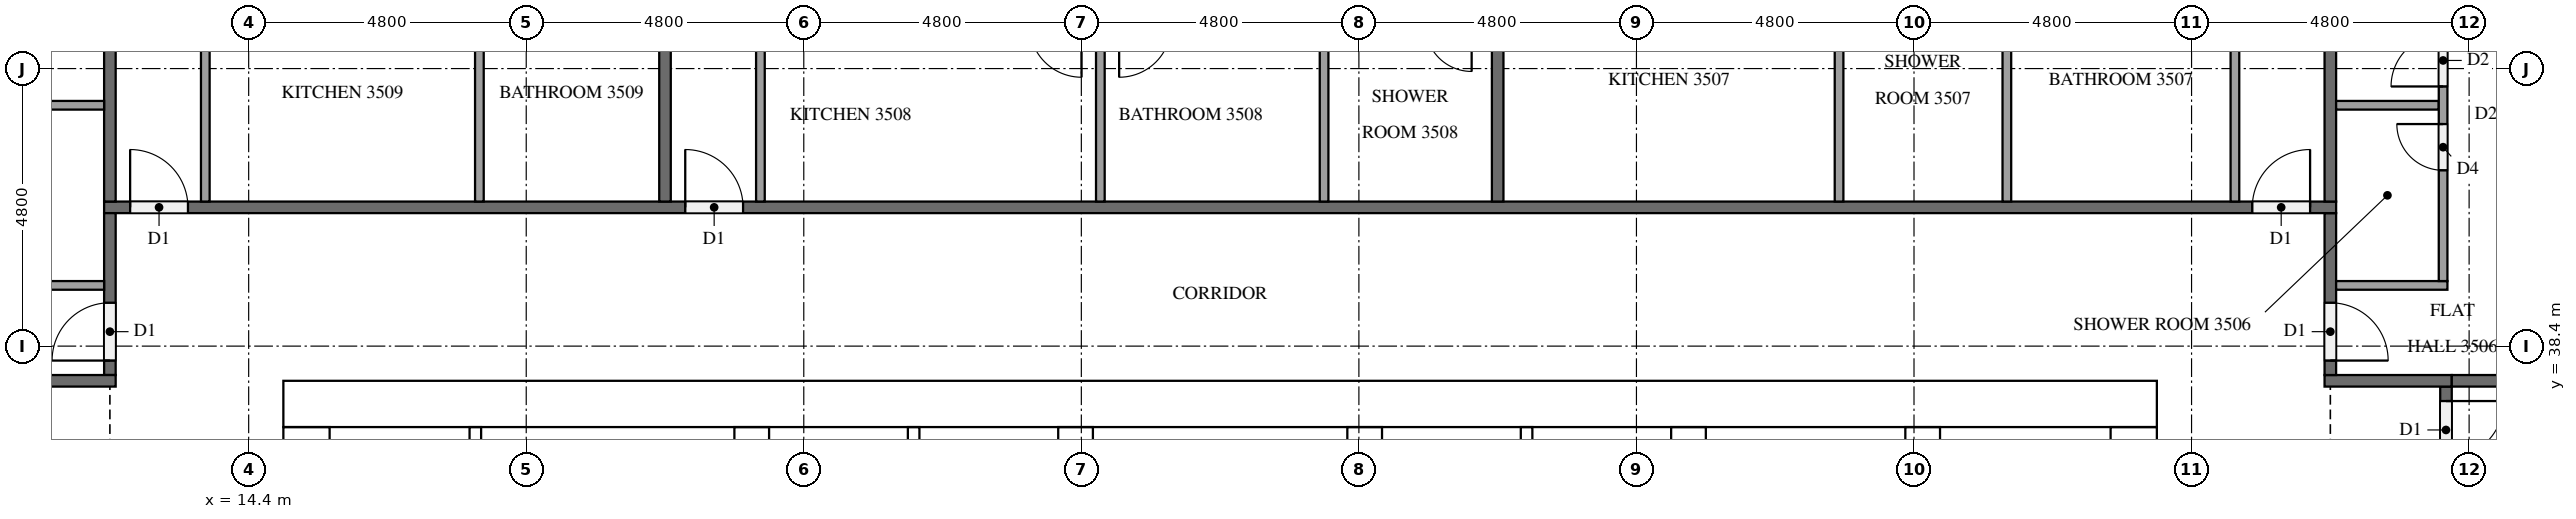
"""IFC4 building model, lengths in metres.
Left out: names, types, materials, properties, quantities, classifications, styles, units other than length and angle.
Written with IfcOpenShell. Run it as: python <this file> out.ifc"""

import sys

from ifc_helpers import new_model, si_unit, direction, frame, frame_2d, origin, place, context, subcontext, project, spatial, rectangle, extrude, element, fill, save


model = new_model("IFC4")
c1 = context("Model", 3, precision=1e-05, world=origin(), true_north=direction((0.0, 1.0)))
c2 = subcontext(c1, "Body", "Model", "MODEL_VIEW")
j1 = project(units=[si_unit("LENGTHUNIT", "METRE"), si_unit("PLANEANGLEUNIT", "RADIAN")], contexts=[c1])
p1 = place(None, origin())
s1 = spatial("IfcSite", under=j1, at=p1, CompositionType="ELEMENT")
p2 = place(p1, origin())
s2 = spatial("IfcBuilding", under=s1, at=p2, CompositionType="ELEMENT")
p3 = place(p2, frame((0.0, 0.0, 136.6)))
s3 = spatial("IfcBuildingStorey", under=s2, at=p3, CompositionType="ELEMENT", Elevation=136.6)
p4 = place(p3, frame((15.0, 37.4, 0.0), z_axis=(0.0, 0.0, 1.0), x_axis=(1.0, 0.0, 0.0)))
e1 = element("IfcWall", 1, at=p4, inside=s3, PredefinedType="SHEAR", context=c2, shape_type="SweptSolid", body=[
    extrude(rectangle(XDim=32.4, YDim=0.8, at=frame_2d((16.2, 0.0))), origin(), (0.0, 0.0, 1.0), 3.2),
])
p5 = place(p4, frame((15.3, 0.0, 0.0)))
e2 = element("IfcOpeningElement", 2, at=p5, cuts=e1, PredefinedType="OPENING", context=c2, shape_type="SweptSolid", body=[
    extrude(rectangle(XDim=1.8, YDim=2.1, at=frame_2d((0.9, 1.05))), frame((0.0, 0.41, 0.0), z_axis=(0.0, -1.0, 0.0), x_axis=(1.0, 0.0, 0.0)), (0.0, 0.0, 1.0), 0.82),
])
p6 = place(p4, frame((1.51, 0.0, 0.0)))
e3 = element("IfcOpeningElement", 3, at=p6, cuts=e1, PredefinedType="OPENING", context=c2, shape_type="SweptSolid", body=[
    extrude(rectangle(XDim=1.0, YDim=2.1, at=frame_2d((0.5, 1.05))), frame((0.0, 0.41, 0.0), z_axis=(0.0, -1.0, 0.0), x_axis=(1.0, 0.0, 0.0)), (0.0, 0.0, 1.0), 0.82),
])
p7 = place(p4, frame((5.11, 0.0, 0.0)))
e4 = element("IfcOpeningElement", 4, at=p7, cuts=e1, PredefinedType="OPENING", context=c2, shape_type="SweptSolid", body=[
    extrude(rectangle(XDim=1.0, YDim=2.1, at=frame_2d((0.5, 1.05))), frame((0.0, 0.41, 0.0), z_axis=(0.0, -1.0, 0.0), x_axis=(1.0, 0.0, 0.0)), (0.0, 0.0, 1.0), 0.82),
])
p8 = place(p3, frame((15.4, 15.8, 0.0), z_axis=(0.0, 0.0, 1.0), x_axis=(0.0, 1.0, 0.0)))
e5 = element("IfcWall", 5, at=p8, inside=s3, PredefinedType="SHEAR", context=c2, shape_type="SweptSolid", body=[
    extrude(rectangle(XDim=21.2, YDim=0.8, at=frame_2d((10.6, 0.0))), origin(), (0.0, 0.0, 1.0), 3.2),
])
p9 = place(p8, frame((4.96, 0.0, 0.0)))
e6 = element("IfcOpeningElement", 6, at=p9, cuts=e5, PredefinedType="OPENING", context=c2, shape_type="SweptSolid", body=[
    extrude(rectangle(XDim=1.2, YDim=2.1, at=frame_2d((0.6, 1.05))), frame((0.0, 0.41, 0.0), z_axis=(0.0, -1.0, 0.0), x_axis=(1.0, 0.0, 0.0)), (0.0, 0.0, 1.0), 0.82),
])
p10 = place(p3, frame((47.0, 15.8, 0.0), z_axis=(0.0, 0.0, 1.0), x_axis=(0.0, 1.0, 0.0)))
e7 = element("IfcWall", 7, at=p10, inside=s3, PredefinedType="SHEAR", context=c2, shape_type="SweptSolid", body=[
    extrude(rectangle(XDim=21.2, YDim=0.8, at=frame_2d((10.6, 0.0))), origin(), (0.0, 0.0, 1.0), 3.2),
])
p11 = place(p10, frame((10.3, 0.0, 0.0)))
e8 = element("IfcOpeningElement", 8, at=p11, cuts=e7, PredefinedType="OPENING", context=c2, shape_type="SweptSolid", body=[
    extrude(rectangle(XDim=1.2, YDim=2.1, at=frame_2d((0.6, 1.05))), frame((0.0, 0.41, 0.0), z_axis=(0.0, -1.0, 0.0), x_axis=(1.0, 0.0, 0.0)), (0.0, 0.0, 1.0), 0.82),
])
p12 = place(p3, frame((23.1, 15.8, 0.0), z_axis=(0.0, 0.0, 1.0), x_axis=(0.0, 1.0, 0.0)))
e9 = element("IfcWall", 9, at=p12, inside=s3, PredefinedType="SHEAR", context=c2, shape_type="SweptSolid", body=[
    extrude(rectangle(XDim=21.2, YDim=0.6, at=frame_2d((10.6, 0.0))), origin(), (0.0, 0.0, 1.0), 3.2),
])
p13 = place(p3, frame((39.3, 27.75, 0.0), z_axis=(0.0, 0.0, 1.0), x_axis=(0.0, 1.0, 0.0)))
e10 = element("IfcWall", 10, at=p13, inside=s3, PredefinedType="SHEAR", context=c2, shape_type="SweptSolid", body=[
    extrude(rectangle(XDim=9.25, YDim=0.6, at=frame_2d((4.625, 0.0))), origin(), (0.0, 0.0, 1.0), 3.2),
])
p14 = place(p3, frame((43.35, 27.75, 0.0), z_axis=(0.0, 0.0, 1.0), x_axis=(0.0, 1.0, 0.0)))
e11 = element("IfcWall", 11, at=p14, inside=s3, PredefinedType="SHEAR", context=c2, shape_type="SweptSolid", body=[
    extrude(rectangle(XDim=9.25, YDim=0.6, at=frame_2d((4.625, 0.0))), origin(), (0.0, 0.0, 1.0), 3.2),
])
p15 = place(p14, frame((7.65, 0.0, 0.0)))
e12 = element("IfcOpeningElement", 12, at=p15, cuts=e11, PredefinedType="OPENING", context=c2, shape_type="SweptSolid", body=[
    extrude(rectangle(XDim=1.2, YDim=2.1, at=frame_2d((0.6, 1.05))), frame((0.0, 0.31, 0.0), z_axis=(0.0, -1.0, 0.0), x_axis=(1.0, 0.0, 0.0)), (0.0, 0.0, 1.0), 0.62),
])
for number, where, z_axis, x_axis in (
    (13, (28.7, 33.85, 0.0), (0.0, 0.0, 1.0), (0.0, 1.0, 0.0)),
    (14, (33.7, 33.85, 0.0), (0.0, 0.0, 1.0), (0.0, 1.0, 0.0)),
):
    element("IfcWall", number, at=place(p3, frame(where, z_axis=z_axis, x_axis=x_axis)), inside=s3, PredefinedType="SHEAR", context=c2, shape_type="SweptSolid", body=[
        extrude(rectangle(XDim=3.15, YDim=0.6, at=frame_2d((1.575, 0.0))), origin(), (0.0, 0.0, 1.0), 3.2),
    ])
for number, where, z_axis, x_axis in (
    (15, (25.9, 33.85, 0.0), (0.0, 0.0, 1.0), (0.0, 1.0, 0.0)),
    (16, (36.5, 33.85, 0.0), (0.0, 0.0, 1.0), (0.0, 1.0, 0.0)),
):
    element("IfcWall", number, at=place(p3, frame(where, z_axis=z_axis, x_axis=x_axis)), inside=s3, PredefinedType="SOLIDWALL", context=c2, shape_type="SweptSolid", body=[
        extrude(rectangle(XDim=3.15, YDim=0.2, at=frame_2d((1.575, 0.0))), origin(), (0.0, 0.0, 1.0), 3.2),
    ])
p16 = place(p3, frame((18.32, 31.55, 0.0), z_axis=(0.0, 0.0, 1.0), x_axis=(0.0, 1.0, 0.0)))
e17 = element("IfcWall", 17, at=p16, inside=s3, PredefinedType="PARTITIONING", context=c2, shape_type="SweptSolid", body=[
    extrude(rectangle(XDim=5.45, YDim=0.2, at=frame_2d((2.725, 0.0))), origin(), (0.0, 0.0, 1.0), 3.2),
])
p17 = place(p3, frame((52.4, 37.7, 0.0), z_axis=(0.0, 0.0, 1.0), x_axis=(0.0, -1.0, 0.0)))
e18 = element("IfcWall", 18, at=p17, inside=s3, PredefinedType="PARTITIONING", context=c2, shape_type="SweptSolid", body=[
    extrude(rectangle(XDim=22.6, YDim=0.2, at=frame_2d((11.3, 0.0))), origin(), (0.0, 0.0, 1.0), 3.2),
])
p18 = place(p17, frame((0.25, 0.0, 0.0)))
e19 = element("IfcOpeningElement", 19, at=p18, cuts=e18, PredefinedType="OPENING", context=c2, shape_type="SweptSolid", body=[
    extrude(rectangle(XDim=1.0, YDim=2.1, at=frame_2d((0.5, 1.05))), frame((0.0, 0.11, 0.0), z_axis=(0.0, -1.0, 0.0), x_axis=(1.0, 0.0, 0.0)), (0.0, 0.0, 1.0), 0.22),
])
p19 = place(p3, frame((52.5, 37.8, 0.0), z_axis=(0.0, 0.0, 1.0), x_axis=(-1.0, 0.0, 0.0)))
e20 = element("IfcWall", 20, at=p19, inside=s3, PredefinedType="PARTITIONING", context=c2, shape_type="SweptSolid", body=[
    extrude(rectangle(XDim=2.2, YDim=0.2, at=frame_2d((1.1, 0.0))), origin(), (0.0, 0.0, 1.0), 3.2),
])
p20 = place(p3, frame((50.4, 40.7, 0.0), z_axis=(0.0, 0.0, 1.0), x_axis=(0.0, -1.0, 0.0)))
e21 = element("IfcWall", 21, at=p20, inside=s3, PredefinedType="PARTITIONING", context=c2, shape_type="SweptSolid", body=[
    extrude(rectangle(XDim=2.8, YDim=0.2, at=frame_2d((1.4, 0.0))), origin(), (0.0, 0.0, 1.0), 3.2),
])
p21 = place(p20, frame((1.55, 0.0, 0.0)))
e22 = element("IfcOpeningElement", 22, at=p21, cuts=e21, PredefinedType="OPENING", context=c2, shape_type="SweptSolid", body=[
    extrude(rectangle(XDim=1.0, YDim=2.1, at=frame_2d((0.5, 1.05))), frame((0.0, 0.11, 0.0), z_axis=(0.0, -1.0, 0.0), x_axis=(1.0, 0.0, 0.0)), (0.0, 0.0, 1.0), 0.22),
])
p22 = place(p3, frame((11.9, 40.8, 0.0), z_axis=(0.0, 0.0, 1.0), x_axis=(1.0, 0.0, 0.0)))
e23 = element("IfcWall", 23, at=p22, inside=s3, PredefinedType="PARTITIONING", context=c2, shape_type="SweptSolid", body=[
    extrude(rectangle(XDim=38.6, YDim=0.2, at=frame_2d((19.3, 0.0))), origin(), (0.0, 0.0, 1.0), 3.2),
])
p23 = place(p22, frame((37.15, 0.0, 0.0)))
e24 = element("IfcOpeningElement", 24, at=p23, cuts=e23, PredefinedType="OPENING", context=c2, shape_type="SweptSolid", body=[
    extrude(rectangle(XDim=1.0, YDim=2.1, at=frame_2d((0.5, 1.05))), frame((0.0, 0.11, 0.0), z_axis=(0.0, -1.0, 0.0), x_axis=(1.0, 0.0, 0.0)), (0.0, 0.0, 1.0), 0.22),
])
p24 = place(p22, frame((10.05, 0.0, 0.0)))
e25 = element("IfcOpeningElement", 25, at=p24, cuts=e23, PredefinedType="OPENING", context=c2, shape_type="SweptSolid", body=[
    extrude(rectangle(XDim=1.0, YDim=2.1, at=frame_2d((0.5, 1.05))), frame((0.0, 0.11, 0.0), z_axis=(0.0, -1.0, 0.0), x_axis=(1.0, 0.0, 0.0)), (0.0, 0.0, 1.0), 0.22),
])
p25 = place(p22, frame((0.45, 0.0, 0.0)))
e26 = element("IfcOpeningElement", 26, at=p25, cuts=e23, PredefinedType="OPENING", context=c2, shape_type="SweptSolid", body=[
    extrude(rectangle(XDim=1.0, YDim=2.1, at=frame_2d((0.5, 1.05))), frame((0.0, 0.11, 0.0), z_axis=(0.0, -1.0, 0.0), x_axis=(1.0, 0.0, 0.0)), (0.0, 0.0, 1.0), 0.22),
])
p26 = place(p3, frame((12.0, 37.9, 0.0), z_axis=(0.0, 0.0, 1.0), x_axis=(0.0, 1.0, 0.0)))
e27 = element("IfcWall", 27, at=p26, inside=s3, PredefinedType="PARTITIONING", context=c2, shape_type="SweptSolid", body=[
    extrude(rectangle(XDim=2.8, YDim=0.2, at=frame_2d((1.4, 0.0))), origin(), (0.0, 0.0, 1.0), 3.2),
])
p27 = place(p26, frame((0.25, 0.0, 0.0)))
e28 = element("IfcOpeningElement", 28, at=p27, cuts=e27, PredefinedType="OPENING", context=c2, shape_type="SweptSolid", body=[
    extrude(rectangle(XDim=1.0, YDim=2.1, at=frame_2d((0.5, 1.05))), frame((0.0, 0.11, 0.0), z_axis=(0.0, -1.0, 0.0), x_axis=(1.0, 0.0, 0.0)), (0.0, 0.0, 1.0), 0.22),
])
p28 = place(p3, frame((12.1, 37.8, 0.0), z_axis=(0.0, 0.0, 1.0), x_axis=(-1.0, 0.0, 0.0)))
e29 = element("IfcWall", 29, at=p28, inside=s3, PredefinedType="PARTITIONING", context=c2, shape_type="SweptSolid", body=[
    extrude(rectangle(XDim=2.2, YDim=0.2, at=frame_2d((1.1, 0.0))), origin(), (0.0, 0.0, 1.0), 3.2),
])
p29 = place(p3, frame((52.5, 37.8, 0.0), z_axis=(0.0, 0.0, 1.0), x_axis=(1.0, 0.0, 0.0)))
e30 = element("IfcWall", 30, at=p29, inside=s3, PredefinedType="PARTITIONING", context=c2, shape_type="SweptSolid", body=[
    extrude(rectangle(XDim=4.725, YDim=0.2, at=frame_2d((2.363, 0.0))), origin(), (0.0, 0.0, 1.0), 3.2),
])
for number, where, z_axis, x_axis in (
    (31, (50.4, 40.9, 0.0), (0.0, 0.0, 1.0), (0.0, 1.0, 0.0)),
    (32, (36.0, 52.7, 0.0), (0.0, 0.0, 1.0), (0.0, -1.0, 0.0)),
    (33, (21.6, 52.7, 0.0), (0.0, 0.0, 1.0), (0.0, -1.0, 0.0)),
    (34, (12.0, 52.7, 0.0), (0.0, 0.0, 1.0), (0.0, -1.0, 0.0)),
):
    element("IfcWall", number, at=place(p3, frame(where, z_axis=z_axis, x_axis=x_axis)), inside=s3, PredefinedType="PARTITIONING", context=c2, shape_type="SweptSolid", body=[
        extrude(rectangle(XDim=11.8, YDim=0.2, at=frame_2d((5.9, 0.0))), origin(), (0.0, 0.0, 1.0), 3.2),
    ])
p30 = place(p3, frame((50.5, 42.565, 0.0), z_axis=(0.0, 0.0, 1.0), x_axis=(1.0, 0.0, 0.0)))
e35 = element("IfcWall", 35, at=p30, inside=s3, PredefinedType="PARTITIONING", context=c2, shape_type="SweptSolid", body=[
    extrude(rectangle(XDim=1.775, YDim=0.15, at=frame_2d((0.887, 0.0))), origin(), (0.0, 0.0, 1.0), 3.2),
])
p31 = place(p3, frame((50.5, 39.45, 0.0), z_axis=(0.0, 0.0, 1.0), x_axis=(1.0, 0.0, 0.0)))
e36 = element("IfcWall", 36, at=p31, inside=s3, PredefinedType="PARTITIONING", context=c2, shape_type="SweptSolid", body=[
    extrude(rectangle(XDim=1.925, YDim=0.15, at=frame_2d((0.962, 0.0))), origin(), (0.0, 0.0, 1.0), 3.2),
])
p32 = place(p3, frame((52.35, 39.525, 0.0), z_axis=(0.0, 0.0, 1.0), x_axis=(0.0, 1.0, 0.0)))
e37 = element("IfcWall", 37, at=p32, inside=s3, PredefinedType="PARTITIONING", context=c2, shape_type="SweptSolid", body=[
    extrude(rectangle(XDim=12.75, YDim=0.15, at=frame_2d((6.375, 0.0))), origin(), (0.0, 0.0, 1.0), 3.2),
])
p33 = place(p32, frame((1.915, 0.0, 0.0)))
e38 = element("IfcOpeningElement", 38, at=p33, cuts=e37, PredefinedType="OPENING", context=c2, shape_type="SweptSolid", body=[
    extrude(rectangle(XDim=0.8, YDim=2.1, at=frame_2d((0.4, 1.05))), frame((0.0, 0.085, 0.0), z_axis=(0.0, -1.0, 0.0), x_axis=(1.0, 0.0, 0.0)), (0.0, 0.0, 1.0), 0.17),
])
p34 = place(p32, frame((3.365, 0.0, 0.0)))
e39 = element("IfcOpeningElement", 39, at=p34, cuts=e37, PredefinedType="OPENING", context=c2, shape_type="SweptSolid", body=[
    extrude(rectangle(XDim=0.9, YDim=2.1, at=frame_2d((0.45, 1.05))), frame((0.0, 0.085, 0.0), z_axis=(0.0, -1.0, 0.0), x_axis=(1.0, 0.0, 0.0)), (0.0, 0.0, 1.0), 0.17),
])
p35 = place(p32, frame((11.55, 0.0, 0.0)))
e40 = element("IfcOpeningElement", 40, at=p35, cuts=e37, PredefinedType="OPENING", context=c2, shape_type="SweptSolid", body=[
    extrude(rectangle(XDim=0.9, YDim=2.1, at=frame_2d((0.45, 1.05))), frame((0.0, 0.085, 0.0), z_axis=(0.0, -1.0, 0.0), x_axis=(1.0, 0.0, 0.0)), (0.0, 0.0, 1.0), 0.17),
])
for number, where, z_axis, x_axis in (
    (41, (44.806, 40.9, 0.0), (0.0, 0.0, 1.0), (0.0, 1.0, 0.0)),
    (42, (41.904, 40.9, 0.0), (0.0, 0.0, 1.0), (0.0, 1.0, 0.0)),
):
    element("IfcWall", number, at=place(p3, frame(where, z_axis=z_axis, x_axis=x_axis)), inside=s3, PredefinedType="PARTITIONING", context=c2, shape_type="SweptSolid", body=[
        extrude(rectangle(XDim=4.175, YDim=0.15, at=frame_2d((2.087, 0.0))), origin(), (0.0, 0.0, 1.0), 3.2),
    ])
p36 = place(p3, frame((48.75, 40.9, 0.0), z_axis=(0.0, 0.0, 1.0), x_axis=(0.0, 1.0, 0.0)))
e43 = element("IfcWall", 43, at=p36, inside=s3, PredefinedType="PARTITIONING", context=c2, shape_type="SweptSolid", body=[
    extrude(rectangle(XDim=4.325, YDim=0.15, at=frame_2d((2.163, 0.0))), origin(), (0.0, 0.0, 1.0), 3.2),
])
for number, where, z_axis, x_axis in (
    (44, (29.129, 40.9, 0.0), (0.0, 0.0, 1.0), (0.0, 1.0, 0.0)),
    (45, (32.998, 40.9, 0.0), (0.0, 0.0, 1.0), (0.0, 1.0, 0.0)),
):
    element("IfcWall", number, at=place(p3, frame(where, z_axis=z_axis, x_axis=x_axis)), inside=s3, PredefinedType="PARTITIONING", context=c2, shape_type="SweptSolid", body=[
        extrude(rectangle(XDim=2.975, YDim=0.15, at=frame_2d((1.488, 0.0))), origin(), (0.0, 0.0, 1.0), 3.2),
    ])
p37 = place(p3, frame((23.25, 40.9, 0.0), z_axis=(0.0, 0.0, 1.0), x_axis=(0.0, 1.0, 0.0)))
e46 = element("IfcWall", 46, at=p37, inside=s3, PredefinedType="PARTITIONING", context=c2, shape_type="SweptSolid", body=[
    extrude(rectangle(XDim=3.125, YDim=0.15, at=frame_2d((1.562, 0.0))), origin(), (0.0, 0.0, 1.0), 3.2),
])
p38 = place(p3, frame((18.39, 40.9, 0.0), z_axis=(0.0, 0.0, 1.0), x_axis=(0.0, 1.0, 0.0)))
e47 = element("IfcWall", 47, at=p38, inside=s3, PredefinedType="PARTITIONING", context=c2, shape_type="SweptSolid", body=[
    extrude(rectangle(XDim=3.725, YDim=0.15, at=frame_2d((1.863, 0.0))), origin(), (0.0, 0.0, 1.0), 3.2),
])
p39 = place(p3, frame((13.65, 40.9, 0.0), z_axis=(0.0, 0.0, 1.0), x_axis=(0.0, 1.0, 0.0)))
e48 = element("IfcWall", 48, at=p39, inside=s3, PredefinedType="PARTITIONING", context=c2, shape_type="SweptSolid", body=[
    extrude(rectangle(XDim=3.875, YDim=0.15, at=frame_2d((1.938, 0.0))), origin(), (0.0, 0.0, 1.0), 3.2),
])
p40 = place(p3, frame((11.9, 42.565, 0.0), z_axis=(0.0, 0.0, 1.0), x_axis=(-1.0, 0.0, 0.0)))
e49 = element("IfcWall", 49, at=p40, inside=s3, PredefinedType="PARTITIONING", context=c2, shape_type="SweptSolid", body=[
    extrude(rectangle(XDim=3.275, YDim=0.15, at=frame_2d((1.637, 0.0))), origin(), (0.0, 0.0, 1.0), 3.2),
])
p41 = place(p3, frame((11.9, 39.45, 0.0), z_axis=(0.0, 0.0, 1.0), x_axis=(-1.0, 0.0, 0.0)))
e50 = element("IfcWall", 50, at=p41, inside=s3, PredefinedType="PARTITIONING", context=c2, shape_type="SweptSolid", body=[
    extrude(rectangle(XDim=3.425, YDim=0.15, at=frame_2d((1.712, 0.0))), origin(), (0.0, 0.0, 1.0), 3.2),
])
p42 = place(p5, origin())
e51 = element("IfcDoor", 51, at=p42, inside=s3, OperationType="DOUBLE_DOOR_SINGLE_SWING", PredefinedType="DOOR", context=c2, shape_type="SweptSolid", body=[
    extrude(rectangle(XDim=1.8, YDim=2.1, at=frame_2d((0.9, 1.05))), frame((0.0, 0.025, 0.0), z_axis=(0.0, -1.0, 0.0), x_axis=(1.0, 0.0, 0.0)), (0.0, 0.0, 1.0), 0.05),
])
fill(e2, e51)
p43 = place(p6, origin())
e52 = element("IfcDoor", 52, at=p43, inside=s3, OperationType="SINGLE_SWING_RIGHT", PredefinedType="DOOR", context=c2, shape_type="SweptSolid", body=[
    extrude(rectangle(XDim=1.0, YDim=2.1, at=frame_2d((0.5, 1.05))), frame((0.0, 0.025, 0.0), z_axis=(0.0, -1.0, 0.0), x_axis=(1.0, 0.0, 0.0)), (0.0, 0.0, 1.0), 0.05),
])
fill(e3, e52)
p44 = place(p7, origin())
e53 = element("IfcDoor", 53, at=p44, inside=s3, OperationType="SINGLE_SWING_LEFT", PredefinedType="DOOR", context=c2, shape_type="SweptSolid", body=[
    extrude(rectangle(XDim=1.0, YDim=2.1, at=frame_2d((0.5, 1.05))), frame((0.0, 0.025, 0.0), z_axis=(0.0, -1.0, 0.0), x_axis=(1.0, 0.0, 0.0)), (0.0, 0.0, 1.0), 0.05),
])
fill(e4, e53)
p45 = place(p18, origin())
e54 = element("IfcDoor", 54, at=p45, inside=s3, OperationType="SINGLE_SWING_LEFT", PredefinedType="DOOR", context=c2, shape_type="SweptSolid", body=[
    extrude(rectangle(XDim=1.0, YDim=2.1, at=frame_2d((0.5, 1.05))), frame((0.0, 0.025, 0.0), z_axis=(0.0, -1.0, 0.0), x_axis=(1.0, 0.0, 0.0)), (0.0, 0.0, 1.0), 0.05),
])
fill(e19, e54)
p46 = place(p21, origin())
e55 = element("IfcDoor", 55, at=p46, inside=s3, OperationType="SINGLE_SWING_RIGHT", PredefinedType="DOOR", context=c2, shape_type="SweptSolid", body=[
    extrude(rectangle(XDim=1.0, YDim=2.1, at=frame_2d((0.5, 1.05))), frame((0.0, 0.025, 0.0), z_axis=(0.0, -1.0, 0.0), x_axis=(1.0, 0.0, 0.0)), (0.0, 0.0, 1.0), 0.05),
])
fill(e22, e55)
p47 = place(p23, origin())
e56 = element("IfcDoor", 56, at=p47, inside=s3, OperationType="SINGLE_SWING_RIGHT", PredefinedType="DOOR", context=c2, shape_type="SweptSolid", body=[
    extrude(rectangle(XDim=1.0, YDim=2.1, at=frame_2d((0.5, 1.05))), frame((0.0, 0.025, 0.0), z_axis=(0.0, -1.0, 0.0), x_axis=(1.0, 0.0, 0.0)), (0.0, 0.0, 1.0), 0.05),
])
fill(e24, e56)
p48 = place(p24, origin())
e57 = element("IfcDoor", 57, at=p48, inside=s3, OperationType="SINGLE_SWING_LEFT", PredefinedType="DOOR", context=c2, shape_type="SweptSolid", body=[
    extrude(rectangle(XDim=1.0, YDim=2.1, at=frame_2d((0.5, 1.05))), frame((0.0, 0.025, 0.0), z_axis=(0.0, -1.0, 0.0), x_axis=(1.0, 0.0, 0.0)), (0.0, 0.0, 1.0), 0.05),
])
fill(e25, e57)
p49 = place(p25, origin())
e58 = element("IfcDoor", 58, at=p49, inside=s3, OperationType="SINGLE_SWING_LEFT", PredefinedType="DOOR", context=c2, shape_type="SweptSolid", body=[
    extrude(rectangle(XDim=1.0, YDim=2.1, at=frame_2d((0.5, 1.05))), frame((0.0, 0.025, 0.0), z_axis=(0.0, -1.0, 0.0), x_axis=(1.0, 0.0, 0.0)), (0.0, 0.0, 1.0), 0.05),
])
fill(e26, e58)
p50 = place(p27, origin())
e59 = element("IfcDoor", 59, at=p50, inside=s3, OperationType="SINGLE_SWING_LEFT", PredefinedType="DOOR", context=c2, shape_type="SweptSolid", body=[
    extrude(rectangle(XDim=1.0, YDim=2.1, at=frame_2d((0.5, 1.05))), frame((0.0, 0.025, 0.0), z_axis=(0.0, -1.0, 0.0), x_axis=(1.0, 0.0, 0.0)), (0.0, 0.0, 1.0), 0.05),
])
fill(e28, e59)
p51 = place(p33, origin())
e60 = element("IfcDoor", 60, at=p51, inside=s3, OperationType="SINGLE_SWING_RIGHT", PredefinedType="DOOR", context=c2, shape_type="SweptSolid", body=[
    extrude(rectangle(XDim=0.8, YDim=2.1, at=frame_2d((0.4, 1.05))), frame((0.0, 0.025, 0.0), z_axis=(0.0, -1.0, 0.0), x_axis=(1.0, 0.0, 0.0)), (0.0, 0.0, 1.0), 0.05),
])
fill(e38, e60)
p52 = place(p34, origin())
e61 = element("IfcDoor", 61, at=p52, inside=s3, OperationType="SINGLE_SWING_LEFT", PredefinedType="DOOR", context=c2, shape_type="SweptSolid", body=[
    extrude(rectangle(XDim=0.9, YDim=2.1, at=frame_2d((0.45, 1.05))), frame((0.0, 0.025, 0.0), z_axis=(0.0, -1.0, 0.0), x_axis=(1.0, 0.0, 0.0)), (0.0, 0.0, 1.0), 0.05),
])
fill(e39, e61)
save(model, sys.argv[1])
